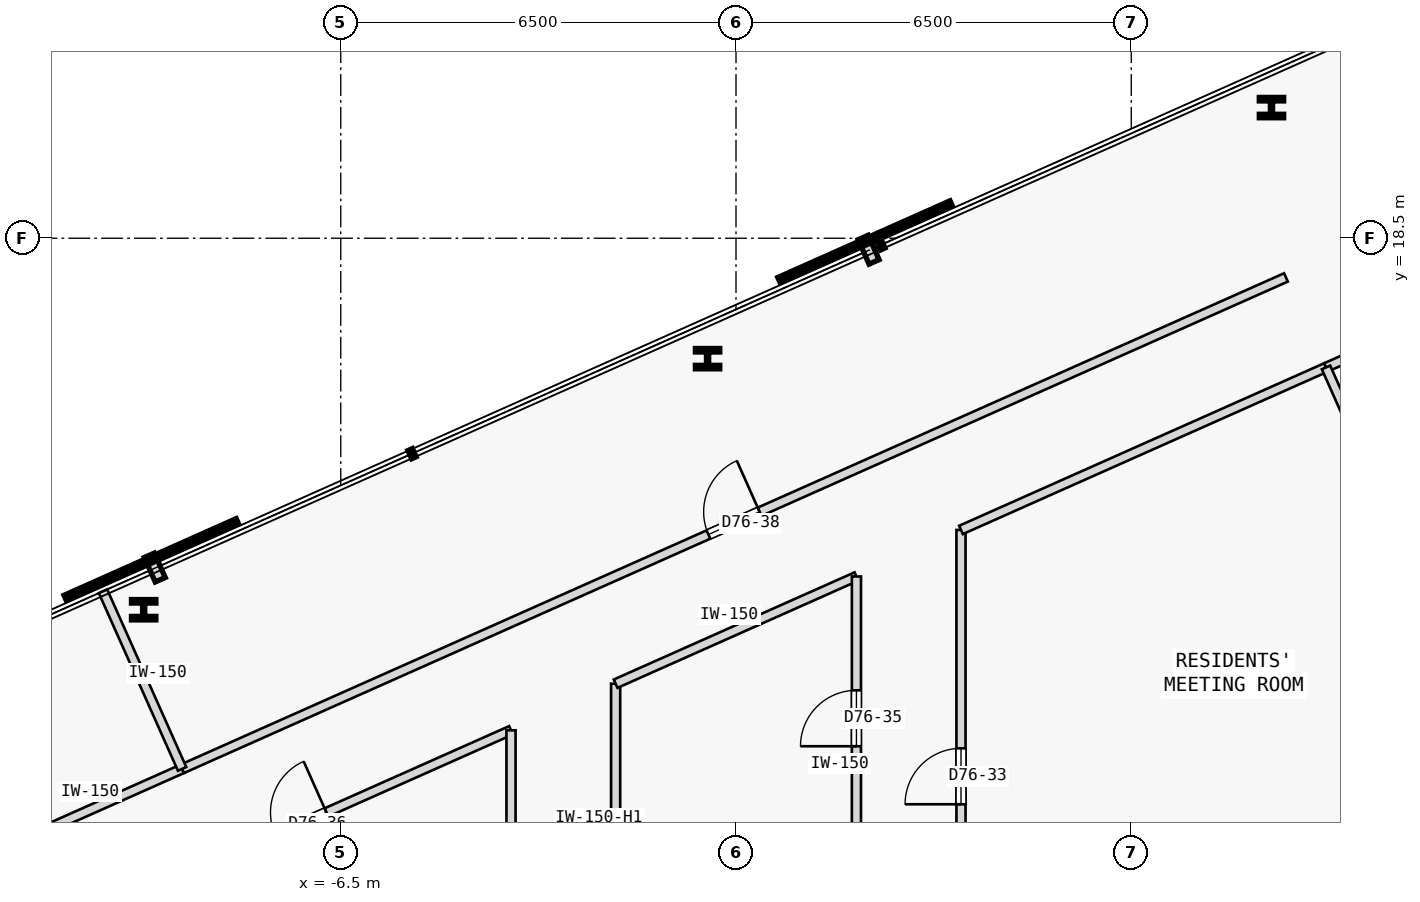
"""IFC4 building model, lengths in metres.
Left out: names, types, materials, properties, quantities, classifications, styles, units other than length and angle.
Written with IfcOpenShell. Run it as: python <this file> out.ifc"""

import sys

from ifc_helpers import new_model, si_unit, direction, frame, frame_2d, origin, origin_2d, place, context, subcontext, project, spatial, rectangle, i_section, extrude, element, fill, save


model = new_model("IFC4")
c1 = context("Model", 3, precision=1e-05, world=origin(), true_north=direction((0.0, 1.0)))
c2 = subcontext(c1, "Body", "Model", "MODEL_VIEW")
j1 = project(units=[si_unit("LENGTHUNIT", "METRE"), si_unit("PLANEANGLEUNIT", "RADIAN")], contexts=[c1])
p1 = place(None, origin())
s1 = spatial("IfcSite", under=j1, at=p1, CompositionType="ELEMENT")
p2 = place(p1, origin())
s2 = spatial("IfcBuilding", under=s1, at=p2, CompositionType="ELEMENT")
p3 = place(p2, frame((0.0, 0.0, 285.25)))
s3 = spatial("IfcBuildingStorey", under=s2, at=p3, CompositionType="ELEMENT", Elevation=285.25)
for number, where, z_axis, x_axis in (
    (1, (8.806, 20.648, 0.0), (0.0, 0.0, 1.0), (1.0, 0.0, 0.0)),
    (2, (-0.468, 16.519, 0.0), (0.0, 0.0, 1.0), (1.0, 0.0, 0.0)),
    (3, (-9.741, 12.39, 0.0), (0.0, 0.0, 1.0), (1.0, 0.0, 0.0)),
):
    element("IfcColumn", number, at=place(p3, frame(where, z_axis=z_axis, x_axis=x_axis)), inside=s3, PredefinedType="COLUMN", context=c2, shape_type="SweptSolid", body=[
        extrude(i_section(OverallWidth=0.401, OverallDepth=0.335, WebThickness=0.036, FlangeThickness=0.058, FilletRadius=0.015, at=origin_2d()), origin(), (0.0, 0.0, 1.0), 3.35),
    ])
p4 = place(p3, frame((3.7, 5.601, 0.0), z_axis=(0.0, 0.0, 1.0), x_axis=(-6.0264561e-05, 0.999999998184, 0.0)))
e4 = element("IfcWall", 4, at=p4, inside=s3, PredefinedType="PARTITIONING", context=c2, shape_type="SweptSolid", body=[
    extrude(rectangle(XDim=8.102, YDim=0.15, at=frame_2d((4.051, 0.0))), origin(), (0.0, 0.0, 1.0), 2.675),
])
p5 = place(p4, frame((3.591, 0.0, 0.0)))
e5 = element("IfcOpeningElement", 5, at=p5, cuts=e4, PredefinedType="OPENING", context=c2, shape_type="SweptSolid", body=[
    extrude(rectangle(XDim=0.92, YDim=2.15, at=frame_2d((0.46, 1.075))), frame((0.0, 0.085, 0.0), z_axis=(0.0, -1.0, 0.0), x_axis=(1.0, 0.0, 0.0)), (0.0, 0.0, 1.0), 0.17),
])
p6 = place(p3, frame((3.7, 13.703, 0.0), z_axis=(0.0, 0.0, 1.0), x_axis=(0.913549363376, 0.406727870542, 0.0)))
e6 = element("IfcWall", 6, at=p6, inside=s3, PredefinedType="PARTITIONING", context=c2, shape_type="SweptSolid", body=[
    extrude(rectangle(XDim=6.571, YDim=0.15, at=frame_2d((3.286, 0.0))), origin(), (0.0, 0.0, 1.0), 3.125),
])
p7 = place(p3, frame((-1.98, 6.749, 0.0), z_axis=(0.0, 0.0, 1.0), x_axis=(0.0, 1.0, 0.0)))
e7 = element("IfcWall", 7, at=p7, inside=s3, PredefinedType="PARTITIONING", context=c2, shape_type="SweptSolid", body=[
    extrude(rectangle(XDim=4.426, YDim=0.15, at=frame_2d((2.213, 0.0))), origin(), (0.0, 0.0, 1.0), 2.675),
])
p8 = place(p3, frame((-1.98, 11.174, 0.0), z_axis=(0.0, 0.0, 1.0), x_axis=(0.913546598225, 0.406734081276, 0.0)))
e8 = element("IfcWall", 8, at=p8, inside=s3, PredefinedType="PARTITIONING", context=c2, shape_type="SweptSolid", body=[
    extrude(rectangle(XDim=4.335, YDim=0.15, at=frame_2d((2.167, 0.0))), origin(), (0.0, 0.0, 1.0), 3.125),
])
p9 = place(p3, frame((1.98, 8.274, 0.0), z_axis=(0.0, 0.0, 1.0), x_axis=(5.2356021e-05, 0.999999998629, 0.0)))
e9 = element("IfcWall", 9, at=p9, inside=s3, PredefinedType="PARTITIONING", context=c2, shape_type="SweptSolid", body=[
    extrude(rectangle(XDim=4.663, YDim=0.15, at=frame_2d((2.332, 0.0))), origin(), (0.0, 0.0, 1.0), 3.125),
])
p10 = place(p9, frame((1.872, 0.0, 0.0)))
e10 = element("IfcOpeningElement", 10, at=p10, cuts=e9, PredefinedType="OPENING", context=c2, shape_type="SweptSolid", body=[
    extrude(rectangle(XDim=0.92, YDim=2.15, at=frame_2d((0.46, 1.075))), frame((0.0, 0.085, 0.0), z_axis=(0.0, -1.0, 0.0), x_axis=(1.0, 0.0, 0.0)), (0.0, 0.0, 1.0), 0.17),
])
p11 = place(p3, frame((-10.612, 7.331, 0.0), z_axis=(0.0, 0.0, 1.0), x_axis=(0.913543890665, 0.406740162546, 0.0)))
e11 = element("IfcWall", 11, at=p11, inside=s3, PredefinedType="PARTITIONING", context=c2, shape_type="SweptSolid", body=[
    extrude(rectangle(XDim=7.566, YDim=0.15, at=frame_2d((3.783, 0.0))), origin(), (0.0, 0.0, 1.0), 3.125),
])
p12 = place(p11, frame((3.323, 0.0, 0.0)))
e12 = element("IfcOpeningElement", 12, at=p12, cuts=e11, PredefinedType="OPENING", context=c2, shape_type="SweptSolid", body=[
    extrude(rectangle(XDim=0.92, YDim=2.15, at=frame_2d((0.46, 1.075))), frame((0.0, 0.085, 0.0), z_axis=(0.0, -1.0, 0.0), x_axis=(1.0, 0.0, 0.0)), (0.0, 0.0, 1.0), 0.17),
])
p13 = place(p3, frame((-3.7, 5.6, 0.0), z_axis=(0.0, 0.0, 1.0), x_axis=(5.077173e-05, 0.999999998711, 0.0)))
e13 = element("IfcWall", 13, at=p13, inside=s3, PredefinedType="PARTITIONING", context=c2, shape_type="SweptSolid", body=[
    extrude(rectangle(XDim=4.809, YDim=0.15, at=frame_2d((2.404, 0.0))), origin(), (0.0, 0.0, 1.0), 3.125),
])
p14 = place(p3, frame((-19.32, 5.227, 0.0), z_axis=(0.0, 0.0, 1.0), x_axis=(0.913543828741, 0.406740301628, 0.0)))
e14 = element("IfcWall", 14, at=p14, inside=s3, PredefinedType="PARTITIONING", context=c2, shape_type="SweptSolid", body=[
    extrude(rectangle(XDim=11.177, YDim=0.15, at=frame_2d((5.588, 0.0))), origin(), (0.0, 0.0, 1.0), 3.125),
])
p15 = place(p14, frame((5.128, 0.0, 0.0)))
e15 = element("IfcOpeningElement", 15, at=p15, cuts=e14, PredefinedType="OPENING", context=c2, shape_type="SweptSolid", body=[
    extrude(rectangle(XDim=0.92, YDim=2.15, at=frame_2d((0.46, 1.075))), frame((0.0, 0.085, 0.0), z_axis=(0.0, -1.0, 0.0), x_axis=(1.0, 0.0, 0.0)), (0.0, 0.0, 1.0), 0.17),
])
p16 = place(p3, frame((-9.109, 9.773, 0.0), z_axis=(0.0, 0.0, 1.0), x_axis=(0.913545361298, 0.406736859469, 0.0)))
e16 = element("IfcWall", 16, at=p16, inside=s3, PredefinedType="PARTITIONING", context=c2, shape_type="SweptSolid", body=[
    extrude(rectangle(XDim=19.871, YDim=0.15, at=frame_2d((9.936, 0.0))), origin(), (0.0, 0.0, 1.0), 3.125),
])
p17 = place(p16, frame((9.476, 0.0, 0.0)))
e17 = element("IfcOpeningElement", 17, at=p17, cuts=e16, PredefinedType="OPENING", context=c2, shape_type="SweptSolid", body=[
    extrude(rectangle(XDim=0.92, YDim=2.15, at=frame_2d((0.46, 1.075))), frame((0.0, 0.085, 0.0), z_axis=(0.0, -1.0, 0.0), x_axis=(1.0, 0.0, 0.0)), (0.0, 0.0, 1.0), 0.17),
])
p18 = place(p3, frame((9.703, 16.375, 0.0), z_axis=(0.0, 0.0, 1.0), x_axis=(0.913544622417, 0.406738519018, 0.0)))
e18 = element("IfcWall", 18, at=p18, inside=s3, PredefinedType="PARTITIONING", context=c2, shape_type="SweptSolid", body=[
    extrude(rectangle(XDim=14.192, YDim=0.15, at=frame_2d((7.096, 0.0))), origin(), (0.0, 0.0, 1.0), 3.125),
])
p19 = place(p18, frame((6.636, 0.0, 0.0)))
e19 = element("IfcOpeningElement", 19, at=p19, cuts=e18, PredefinedType="OPENING", context=c2, shape_type="SweptSolid", body=[
    extrude(rectangle(XDim=0.92, YDim=2.15, at=frame_2d((0.46, 1.075))), frame((0.0, 0.085, 0.0), z_axis=(0.0, -1.0, 0.0), x_axis=(1.0, 0.0, 0.0)), (0.0, 0.0, 1.0), 0.17),
])
p20 = place(p3, frame((11.046, 13.357, 0.0), z_axis=(0.0, 0.0, 1.0), x_axis=(-0.406714303965, 0.913555403328, 0.0)))
e20 = element("IfcWall", 20, at=p20, inside=s3, PredefinedType="PARTITIONING", context=c2, shape_type="SweptSolid", body=[
    extrude(rectangle(XDim=3.304, YDim=0.15, at=frame_2d((1.652, 0.0))), origin(), (0.0, 0.0, 1.0), 3.125),
])
p21 = place(p3, frame((-9.109, 9.773, 0.0), z_axis=(0.0, 0.0, 1.0), x_axis=(-0.406698002142, 0.913562660716, 0.0)))
e21 = element("IfcWall", 21, at=p21, inside=s3, PredefinedType="PARTITIONING", context=c2, shape_type="SweptSolid", body=[
    extrude(rectangle(XDim=3.198, YDim=0.15, at=frame_2d((1.599, 0.0))), origin(), (0.0, 0.0, 1.0), 3.125),
])
p22 = place(p5, origin())
e22 = element("IfcDoor", 22, at=p22, inside=s3, OperationType="SINGLE_SWING_LEFT", PredefinedType="DOOR", context=c2, shape_type="SweptSolid", body=[
    extrude(rectangle(XDim=0.92, YDim=2.15, at=frame_2d((0.46, 1.075))), frame((0.0, 0.025, 0.0), z_axis=(0.0, -1.0, 0.0), x_axis=(1.0, 0.0, 0.0)), (0.0, 0.0, 1.0), 0.05),
])
fill(e5, e22)
p23 = place(p10, origin())
e23 = element("IfcDoor", 23, at=p23, inside=s3, OperationType="SINGLE_SWING_LEFT", PredefinedType="DOOR", context=c2, shape_type="SweptSolid", body=[
    extrude(rectangle(XDim=0.92, YDim=2.15, at=frame_2d((0.46, 1.075))), frame((0.0, 0.025, 0.0), z_axis=(0.0, -1.0, 0.0), x_axis=(1.0, 0.0, 0.0)), (0.0, 0.0, 1.0), 0.05),
])
fill(e10, e23)
p24 = place(p12, origin())
e24 = element("IfcDoor", 24, at=p24, inside=s3, OperationType="SINGLE_SWING_RIGHT", PredefinedType="DOOR", context=c2, shape_type="SweptSolid", body=[
    extrude(rectangle(XDim=0.92, YDim=2.15, at=frame_2d((0.46, 1.075))), frame((0.0, 0.025, 0.0), z_axis=(0.0, -1.0, 0.0), x_axis=(1.0, 0.0, 0.0)), (0.0, 0.0, 1.0), 0.05),
])
fill(e12, e24)
p25 = place(p17, origin())
e25 = element("IfcDoor", 25, at=p25, inside=s3, OperationType="SINGLE_SWING_RIGHT", PredefinedType="DOOR", context=c2, shape_type="SweptSolid", body=[
    extrude(rectangle(XDim=0.92, YDim=2.15, at=frame_2d((0.46, 1.075))), frame((0.0, 0.025, 0.0), z_axis=(0.0, -1.0, 0.0), x_axis=(1.0, 0.0, 0.0)), (0.0, 0.0, 1.0), 0.05),
])
fill(e17, e25)
save(model, sys.argv[1])
